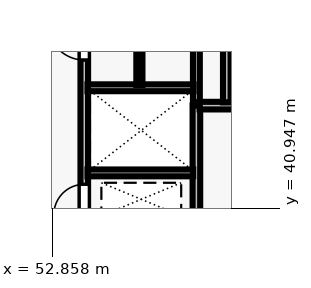
"""IFC4 building model, lengths in metres.
Left out: names, types, materials, properties, quantities, classifications, styles, units other than length and angle.
Written with IfcOpenShell. Run it as: python <this file> out.ifc"""

import sys

from ifc_helpers import new_model, si_unit, direction, frame, frame_2d, origin, place, context, subcontext, project, spatial, rectangle, extrude, element, fill, save


model = new_model("IFC4")
c1 = context("Model", 3, precision=1e-05, world=origin(), true_north=direction((0.0, 1.0)))
c2 = subcontext(c1, "Body", "Model", "MODEL_VIEW")
j1 = project(units=[si_unit("LENGTHUNIT", "METRE"), si_unit("PLANEANGLEUNIT", "RADIAN")], contexts=[c1])
p1 = place(None, origin())
s1 = spatial("IfcSite", under=j1, at=p1, CompositionType="ELEMENT")
p2 = place(p1, origin())
s2 = spatial("IfcBuilding", under=s1, at=p2, CompositionType="ELEMENT")
p3 = place(p2, frame((0.0, 0.0, 79.5)))
s3 = spatial("IfcBuildingStorey", under=s2, at=p3, CompositionType="ELEMENT", Elevation=79.5)
p4 = place(p3, frame((53.7, 40.585, 0.0), z_axis=(0.0, 0.0, 1.0), x_axis=(0.0, 1.0, 0.0)))
e1 = element("IfcWall", 1, at=p4, inside=s3, PredefinedType="SOLIDWALL", context=c2, shape_type="SweptSolid", body=[
    extrude(rectangle(XDim=6.655, YDim=0.2, at=frame_2d((3.328, 0.0))), origin(), (0.0, 0.0, 1.0), 3.28),
])
p5 = place(p4, frame((0.195, 0.0, 0.0)))
e2 = element("IfcOpeningElement", 2, at=p5, cuts=e1, PredefinedType="OPENING", context=c2, shape_type="SweptSolid", body=[
    extrude(rectangle(XDim=0.8, YDim=2.08, at=frame_2d((0.4, 1.04))), frame((0.0, 0.11, 0.0), z_axis=(0.0, -1.0, 0.0), x_axis=(1.0, 0.0, 0.0)), (0.0, 0.0, 1.0), 0.22),
])
p6 = place(p4, frame((4.265, 0.0, 0.0)))
e3 = element("IfcOpeningElement", 3, at=p6, cuts=e1, PredefinedType="OPENING", context=c2, shape_type="SweptSolid", body=[
    extrude(rectangle(XDim=0.95, YDim=2.12, at=frame_2d((0.475, 1.06))), frame((0.0, 0.11, 0.0), z_axis=(0.0, -1.0, 0.0), x_axis=(1.0, 0.0, 0.0)), (0.0, 0.0, 1.0), 0.22),
])
p7 = place(p3, frame((56.65, 38.785, 0.0), z_axis=(0.0, 0.0, 1.0), x_axis=(0.0, 1.0, 0.0)))
e4 = element("IfcWall", 4, at=p7, inside=s3, PredefinedType="SOLIDWALL", context=c2, shape_type="SweptSolid", body=[
    extrude(rectangle(XDim=4.865, YDim=0.2, at=frame_2d((2.433, 0.0))), origin(), (0.0, 0.0, 1.0), 3.28),
])
p8 = place(p7, frame((0.265, 0.0, 0.0)))
e5 = element("IfcOpeningElement", 5, at=p8, cuts=e4, PredefinedType="OPENING", context=c2, shape_type="SweptSolid", body=[
    extrude(rectangle(XDim=1.0, YDim=2.15, at=frame_2d((0.5, 1.075))), frame((0.0, 0.11, 0.0), z_axis=(0.0, -1.0, 0.0), x_axis=(1.0, 0.0, 0.0)), (0.0, 0.0, 1.0), 0.22),
])
p9 = place(p3, frame((56.735, 43.65, 0.0), z_axis=(0.0, 0.0, 1.0), x_axis=(1.0, 0.0, 0.0)))
e6 = element("IfcWall", 6, at=p9, inside=s3, PredefinedType="SOLIDWALL", context=c2, shape_type="SweptSolid", body=[
    extrude(rectangle(XDim=3.505, YDim=0.2, at=frame_2d((1.752, 0.0))), origin(), (0.0, 0.0, 1.0), 3.28),
])
p10 = place(p9, frame((1.295, 0.0, 0.0)))
e7 = element("IfcOpeningElement", 7, at=p10, cuts=e6, PredefinedType="OPENING", context=c2, shape_type="SweptSolid", body=[
    extrude(rectangle(XDim=1.1, YDim=2.2, at=frame_2d((0.55, 1.1))), frame((0.0, 0.11, 0.0), z_axis=(0.0, -1.0, 0.0), x_axis=(1.0, 0.0, 0.0)), (0.0, 0.0, 1.0), 0.22),
])
p11 = place(p3, frame((57.45, 43.735, 0.0), z_axis=(0.0, 0.0, 1.0), x_axis=(0.0, 1.0, 0.0)))
e8 = element("IfcWall", 8, at=p11, inside=s3, PredefinedType="SOLIDWALL", context=c2, shape_type="SweptSolid", body=[
    extrude(rectangle(XDim=3.505, YDim=0.2, at=frame_2d((1.752, 0.0))), origin(), (0.0, 0.0, 1.0), 3.28),
])
p12 = place(p3, frame((56.65, 43.735, 0.0), z_axis=(0.0, 0.0, 1.0), x_axis=(0.0, 1.0, 0.0)))
e9 = element("IfcWall", 9, at=p12, inside=s3, PredefinedType="SOLIDWALL", context=c2, shape_type="SweptSolid", body=[
    extrude(rectangle(XDim=3.505, YDim=0.18, at=frame_2d((1.752, 0.0))), origin(), (0.0, 0.0, 1.0), 3.28),
])
p13 = place(p3, frame((53.785, 41.88, 0.0), z_axis=(0.0, 0.0, 1.0), x_axis=(1.0, 0.0, 0.0)))
e10 = element("IfcWall", 10, at=p13, inside=s3, PredefinedType="SOLIDWALL", context=c2, shape_type="SweptSolid", body=[
    extrude(rectangle(XDim=2.78, YDim=0.18, at=frame_2d((1.39, 0.0))), origin(), (0.0, 0.0, 1.0), 3.28),
])
p14 = place(p3, frame((53.785, 44.12, 0.0), z_axis=(0.0, 0.0, 1.0), x_axis=(1.0, 0.0, 0.0)))
e11 = element("IfcWall", 11, at=p14, inside=s3, PredefinedType="SOLIDWALL", context=c2, shape_type="SweptSolid", body=[
    extrude(rectangle(XDim=2.79, YDim=0.18, at=frame_2d((1.395, 0.0))), origin(), (0.0, 0.0, 1.0), 3.28),
])
p15 = place(p3, frame((55.15, 44.195, 0.0), z_axis=(0.0, 0.0, 1.0), x_axis=(0.0, 1.0, 0.0)))
e12 = element("IfcWall", 12, at=p15, inside=s3, PredefinedType="PARTITIONING", context=c2, shape_type="SweptSolid", body=[
    extrude(rectangle(XDim=3.045, YDim=0.16, at=frame_2d((1.522, 0.0))), origin(), (0.0, 0.0, 1.0), 3.28),
])
p16 = place(p15, frame((1.025, 0.0, 0.0)))
e13 = element("IfcOpeningElement", 13, at=p16, cuts=e12, PredefinedType="OPENING", context=c2, shape_type="SweptSolid", body=[
    extrude(rectangle(XDim=0.8, YDim=2.1, at=frame_2d((0.4, 1.05))), frame((0.0, 0.09, 0.0), z_axis=(0.0, -1.0, 0.0), x_axis=(1.0, 0.0, 0.0)), (0.0, 0.0, 1.0), 0.18),
])
p17 = place(p5, origin())
e14 = element("IfcDoor", 14, at=p17, inside=s3, OperationType="SINGLE_SWING_LEFT", PredefinedType="DOOR", context=c2, shape_type="SweptSolid", body=[
    extrude(rectangle(XDim=0.8, YDim=2.08, at=frame_2d((0.4, 1.04))), frame((0.0, 0.025, 0.0), z_axis=(0.0, -1.0, 0.0), x_axis=(1.0, 0.0, 0.0)), (0.0, 0.0, 1.0), 0.05),
])
fill(e2, e14)
p18 = place(p6, origin())
e15 = element("IfcDoor", 15, at=p18, inside=s3, OperationType="SINGLE_SWING_RIGHT", PredefinedType="DOOR", context=c2, shape_type="SweptSolid", body=[
    extrude(rectangle(XDim=0.95, YDim=2.12, at=frame_2d((0.475, 1.06))), frame((0.0, 0.025, 0.0), z_axis=(0.0, -1.0, 0.0), x_axis=(1.0, 0.0, 0.0)), (0.0, 0.0, 1.0), 0.05),
])
fill(e3, e15)
save(model, sys.argv[1])
